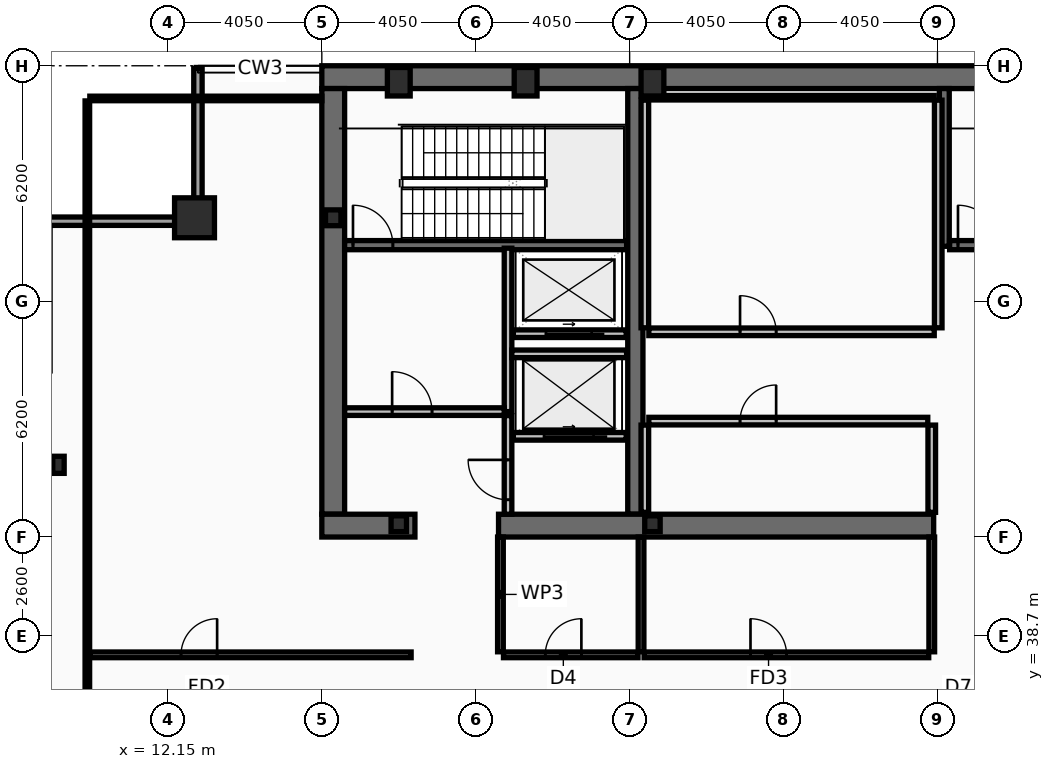
"""IFC4 building model, lengths in metres.
Left out: names, types, materials, properties, quantities, classifications, styles, units other than length and angle.
Written with IfcOpenShell. Run it as: python <this file> out.ifc"""

import sys

from ifc_helpers import new_model, si_unit, direction, frame, frame_2d, origin, origin_2d, place, context, subcontext, project, spatial, rectangle, hollow_rectangle, i_section, extrude, element, fill, save


model = new_model("IFC4")
c1 = context("Model", 3, precision=1e-05, world=origin(), true_north=direction((0.0, 1.0)))
c2 = subcontext(c1, "Body", "Model", "MODEL_VIEW")
j1 = project(units=[si_unit("LENGTHUNIT", "METRE"), si_unit("PLANEANGLEUNIT", "RADIAN")], contexts=[c1])
p1 = place(None, origin())
s1 = spatial("IfcSite", under=j1, at=p1, CompositionType="ELEMENT")
p2 = place(p1, origin())
s2 = spatial("IfcBuilding", under=s1, at=p2, CompositionType="ELEMENT")
p3 = place(p2, frame((0.0, 0.0, 257.0)))
s3 = spatial("IfcBuildingStorey", under=s2, at=p3, CompositionType="ELEMENT", Elevation=257.0)
p4 = place(p3, frame((16.2, 53.4, 0.0), z_axis=(0.0, 0.0, 1.0), x_axis=(1.0, 0.0, 0.0)))
e1 = element("IfcWall", 1, at=p4, inside=s3, PredefinedType="SHEAR", context=c2, shape_type="SweptSolid", body=[
    extrude(rectangle(XDim=40.5, YDim=0.6, at=frame_2d((20.25, 0.0))), origin(), (0.0, 0.0, 1.0), 4.64),
])
p5 = place(p3, frame((16.5, 41.9, 0.0), z_axis=(0.0, 0.0, 1.0), x_axis=(0.0, 1.0, 0.0)))
e2 = element("IfcWall", 2, at=p5, inside=s3, PredefinedType="SHEAR", context=c2, shape_type="SweptSolid", body=[
    extrude(rectangle(XDim=11.2, YDim=0.6, at=frame_2d((5.6, 0.0))), origin(), (0.0, 0.0, 1.0), 4.64),
])
p6 = place(p3, frame((24.45, 41.9, 0.0), z_axis=(0.0, 0.0, 1.0), x_axis=(0.0, 1.0, 0.0)))
e3 = element("IfcWall", 3, at=p6, inside=s3, PredefinedType="SHEAR", context=c2, shape_type="SweptSolid", body=[
    extrude(rectangle(XDim=11.2, YDim=0.4, at=frame_2d((5.6, 0.0))), origin(), (0.0, 0.0, 1.0), 4.64),
])
p7 = place(p3, frame((18.65, 41.6, 0.0), z_axis=(0.0, 0.0, 1.0), x_axis=(-1.0, 0.0, 0.0)))
e4 = element("IfcWall", 4, at=p7, inside=s3, PredefinedType="SHEAR", context=c2, shape_type="SweptSolid", body=[
    extrude(rectangle(XDim=2.45, YDim=0.6, at=frame_2d((1.225, 0.0))), origin(), (0.0, 0.0, 1.0), 4.64),
])
p8 = place(p3, frame((32.3, 41.6, 0.0), z_axis=(0.0, 0.0, 1.0), x_axis=(-1.0, 0.0, 0.0)))
e5 = element("IfcWall", 5, at=p8, inside=s3, PredefinedType="SHEAR", context=c2, shape_type="SweptSolid", body=[
    extrude(rectangle(XDim=11.45, YDim=0.6, at=frame_2d((5.725, 0.0))), origin(), (0.0, 0.0, 1.0), 4.64),
])
p9 = place(p3, frame((32.58, 48.95, 0.0), z_axis=(0.0, 0.0, 1.0), x_axis=(0.0, 1.0, 0.0)))
e6 = element("IfcWall", 6, at=p9, inside=s3, PredefinedType="SHEAR", context=c2, shape_type="SweptSolid", body=[
    extrude(rectangle(XDim=4.15, YDim=0.26, at=frame_2d((2.075, 0.0))), origin(), (0.0, 0.0, 1.0), 4.64),
])
p10 = place(p3, frame((16.8, 48.98, 0.0), z_axis=(0.0, 0.0, 1.0), x_axis=(1.0, 0.0, 0.0)))
e7 = element("IfcWall", 7, at=p10, inside=s3, PredefinedType="SHEAR", context=c2, shape_type="SweptSolid", body=[
    extrude(rectangle(XDim=7.42, YDim=0.24, at=frame_2d((3.71, 0.0))), origin(), (0.0, 0.0, 1.0), 4.64),
])
p11 = place(p10, frame((0.22, 0.0, 0.0)))
e8 = element("IfcOpeningElement", 8, at=p11, cuts=e7, PredefinedType="OPENING", context=c2, shape_type="SweptSolid", body=[
    extrude(rectangle(XDim=1.05, YDim=2.15, at=frame_2d((0.525, 1.075))), frame((0.0, 0.13, 0.0), z_axis=(0.0, -1.0, 0.0), x_axis=(1.0, 0.0, 0.0)), (0.0, 0.0, 1.0), 0.26),
])
p12 = place(p3, frame((32.72, 48.98, 0.0), z_axis=(0.0, 0.0, 1.0), x_axis=(1.0, 0.0, 0.0)))
e9 = element("IfcWall", 9, at=p12, inside=s3, PredefinedType="SHEAR", context=c2, shape_type="SweptSolid", body=[
    extrude(rectangle(XDim=7.56, YDim=0.24, at=frame_2d((3.78, 0.0))), origin(), (0.0, 0.0, 1.0), 4.64),
])
p13 = place(p12, frame((0.22, 0.0, 0.0)))
e10 = element("IfcOpeningElement", 10, at=p13, cuts=e9, PredefinedType="OPENING", context=c2, shape_type="SweptSolid", body=[
    extrude(rectangle(XDim=1.05, YDim=2.15, at=frame_2d((0.525, 1.075))), frame((0.0, 0.13, 0.0), z_axis=(0.0, -1.0, 0.0), x_axis=(1.0, 0.0, 0.0)), (0.0, 0.0, 1.0), 0.26),
])
p14 = place(p3, frame((12.85, 49.7, 0.0), z_axis=(0.0, 0.0, 1.0), x_axis=(1.0, 0.0, 0.0)))
e11 = element("IfcColumn", 11, at=p14, inside=s3, PredefinedType="COLUMN", context=c2, shape_type="SweptSolid", body=[
    extrude(hollow_rectangle(XDim=1.05, YDim=1.05, WallThickness=0.055, at=origin_2d()), origin(), (0.0, 0.0, 1.0), 4.8),
])
for number, where, z_axis, x_axis in (
    (12, (18.225, 53.28, 0.0), (0.0, 0.0, 1.0), (1.0, 0.0, 0.0)),
    (13, (21.562, 53.28, 0.0), (0.0, 0.0, 1.0), (1.0, 0.0, 0.0)),
    (14, (24.9, 53.28, 0.0), (0.0, 0.0, 1.0), (1.0, 0.0, 0.0)),
):
    element("IfcColumn", number, at=place(p3, frame(where, z_axis=z_axis, x_axis=x_axis)), inside=s3, PredefinedType="COLUMN", context=c2, shape_type="SweptSolid", body=[
        extrude(hollow_rectangle(XDim=0.6, YDim=0.75, WallThickness=0.045, at=origin_2d()), origin(), (0.0, 0.0, 1.0), 4.8),
    ])
p15 = place(p3, frame((9.27, 43.2, 0.0), z_axis=(0.0, 0.0, 1.0), x_axis=(1.0, 0.0, 0.0)))
e15 = element("IfcColumn", 15, at=p15, inside=s3, PredefinedType="COLUMN", context=c2, shape_type="SweptSolid", body=[
    extrude(i_section(OverallWidth=0.3, OverallDepth=0.45, WebThickness=0.014, FlangeThickness=0.026, at=origin_2d()), origin(), (0.0, 0.0, 1.0), 4.8),
])
for number, where, z_axis, x_axis in (
    (16, (16.5, 49.7, 0.0), (0.0, 0.0, 1.0), (1.0, 0.0, 0.0)),
    (17, (18.225, 41.65, 0.0), (0.0, 0.0, 1.0), (1.0, 0.0, 0.0)),
    (18, (24.9, 41.65, 0.0), (0.0, 0.0, 1.0), (1.0, 0.0, 0.0)),
):
    element("IfcColumn", number, at=place(p3, frame(where, z_axis=z_axis, x_axis=x_axis)), inside=s3, PredefinedType="COLUMN", context=c2, shape_type="SweptSolid", body=[
        extrude(i_section(OverallWidth=0.406, OverallDepth=0.416, WebThickness=0.03, FlangeThickness=0.048, at=origin_2d()), origin(), (0.0, 0.0, 1.0), 4.8),
    ])
p16 = place(p3, frame((8.83, 49.61, 0.0), z_axis=(0.0, 0.0, 1.0), x_axis=(1.0, 0.0, 0.0)))
e19 = element("IfcWall", 19, at=p16, inside=s3, PredefinedType="SOLIDWALL", context=c2, shape_type="SweptSolid", body=[
    extrude(rectangle(XDim=4.22, YDim=0.22, at=frame_2d((2.11, 0.0))), origin(), (0.0, 0.0, 1.0), 4.03),
])
p17 = place(p3, frame((12.94, 49.72, 0.0), z_axis=(0.0, 0.0, 1.0), x_axis=(0.0, 1.0, 0.0)))
e20 = element("IfcWall", 20, at=p17, inside=s3, PredefinedType="SOLIDWALL", context=c2, shape_type="SweptSolid", body=[
    extrude(rectangle(XDim=3.91, YDim=0.22, at=frame_2d((1.955, 0.0))), origin(), (0.0, 0.0, 1.0), 4.03),
])
p18 = place(p3, frame((24.21, 43.95, 0.0), z_axis=(0.0, 0.0, 1.0), x_axis=(-1.0, 0.0, 0.0)))
e21 = element("IfcWall", 21, at=p18, inside=s3, PredefinedType="PARTITIONING", context=c2, shape_type="SweptSolid", body=[
    extrude(rectangle(XDim=2.97, YDim=0.2, at=frame_2d((1.485, 0.0))), origin(), (0.0, 0.0, 1.0), 4.64),
])
p19 = place(p18, frame((0.86, 0.0, 0.0)))
e22 = element("IfcOpeningElement", 22, at=p19, cuts=e21, PredefinedType="OPENING", context=c2, shape_type="SweptSolid", body=[
    extrude(rectangle(XDim=1.3, YDim=2.18, at=frame_2d((0.65, 1.09))), frame((0.0, 0.11, 0.0), z_axis=(0.0, -1.0, 0.0), x_axis=(1.0, 0.0, 0.0)), (0.0, 0.0, 1.0), 0.22),
])
p20 = place(p3, frame((24.21, 46.65, 0.0), z_axis=(0.0, 0.0, 1.0), x_axis=(-1.0, 0.0, 0.0)))
e23 = element("IfcWall", 23, at=p20, inside=s3, PredefinedType="PARTITIONING", context=c2, shape_type="SweptSolid", body=[
    extrude(rectangle(XDim=2.97, YDim=0.2, at=frame_2d((1.485, 0.0))), origin(), (0.0, 0.0, 1.0), 4.64),
])
p21 = place(p20, frame((0.91, 0.0, 0.0)))
e24 = element("IfcOpeningElement", 24, at=p21, cuts=e23, PredefinedType="OPENING", context=c2, shape_type="SweptSolid", body=[
    extrude(rectangle(XDim=1.2, YDim=2.18, at=frame_2d((0.6, 1.09))), frame((0.0, 0.11, 0.0), z_axis=(0.0, -1.0, 0.0), x_axis=(1.0, 0.0, 0.0)), (0.0, 0.0, 1.0), 0.22),
])
p22 = place(p3, frame((21.1, 44.6, 0.0), z_axis=(0.0, 0.0, 1.0), x_axis=(0.0, 1.0, 0.0)))
e25 = element("IfcWall", 25, at=p22, inside=s3, PredefinedType="PARTITIONING", context=c2, shape_type="SweptSolid", body=[
    extrude(rectangle(XDim=4.3, YDim=0.2, at=frame_2d((2.15, 0.0))), origin(), (0.0, 0.0, 1.0), 4.64),
])
p23 = place(p3, frame((16.8, 44.6, 0.0), z_axis=(0.0, 0.0, 1.0), x_axis=(1.0, 0.0, 0.0)))
e26 = element("IfcWall", 26, at=p23, inside=s3, PredefinedType="PARTITIONING", context=c2, shape_type="SweptSolid", body=[
    extrude(rectangle(XDim=4.2, YDim=0.2, at=frame_2d((2.1, 0.0))), origin(), (0.0, 0.0, 1.0), 4.64),
])
p24 = place(p23, frame((1.25, 0.0, 0.0)))
e27 = element("IfcOpeningElement", 27, at=p24, cuts=e26, PredefinedType="OPENING", context=c2, shape_type="SweptSolid", body=[
    extrude(rectangle(XDim=1.05, YDim=2.15, at=frame_2d((0.525, 1.075))), frame((0.0, 0.11, 0.0), z_axis=(0.0, -1.0, 0.0), x_axis=(1.0, 0.0, 0.0)), (0.0, 0.0, 1.0), 0.22),
])
p25 = place(p3, frame((21.2, 46.12, 0.0), z_axis=(0.0, 0.0, 1.0), x_axis=(1.0, 0.0, 0.0)))
e28 = element("IfcWall", 28, at=p25, inside=s3, PredefinedType="PARTITIONING", context=c2, shape_type="SweptSolid", body=[
    extrude(rectangle(XDim=3.02, YDim=0.2, at=frame_2d((1.51, 0.0))), origin(), (0.0, 0.0, 1.0), 4.64),
])
p26 = place(p3, frame((21.1, 41.9, 0.0), z_axis=(0.0, 0.0, 1.0), x_axis=(0.0, 1.0, 0.0)))
e29 = element("IfcWall", 29, at=p26, inside=s3, PredefinedType="PARTITIONING", context=c2, shape_type="SweptSolid", body=[
    extrude(rectangle(XDim=2.595, YDim=0.2, at=frame_2d((1.298, 0.0))), origin(), (0.0, 0.0, 1.0), 4.64),
])
p27 = place(p26, frame((0.38, 0.0, 0.0)))
e30 = element("IfcOpeningElement", 30, at=p27, cuts=e29, PredefinedType="OPENING", context=c2, shape_type="SweptSolid", body=[
    extrude(rectangle(XDim=1.05, YDim=2.15, at=frame_2d((0.525, 1.075))), frame((0.0, 0.11, 0.0), z_axis=(0.0, -1.0, 0.0), x_axis=(1.0, 0.0, 0.0)), (0.0, 0.0, 1.0), 0.22),
])
for number, where, z_axis, x_axis in (
    (31, (24.7, 46.805, 0.0), (0.0, 0.0, 1.0), (0.0, 1.0, 0.0)),
    (32, (32.42, 46.805, 0.0), (0.0, 0.0, 1.0), (0.0, 1.0, 0.0)),
):
    element("IfcWall", number, at=place(p3, frame(where, z_axis=z_axis, x_axis=x_axis)), inside=s3, PredefinedType="PARTITIONING", context=c2, shape_type="SweptSolid", body=[
        extrude(rectangle(XDim=5.99, YDim=0.2, at=frame_2d((2.995, 0.0))), origin(), (0.0, 0.0, 1.0), 4.64),
    ])
p28 = place(p3, frame((24.805, 52.86, 0.0), z_axis=(0.0, 0.0, 1.0), x_axis=(1.0, 0.0, 0.0)))
e33 = element("IfcWall", 33, at=p28, inside=s3, PredefinedType="PARTITIONING", context=c2, shape_type="SweptSolid", body=[
    extrude(rectangle(XDim=7.51, YDim=0.12, at=frame_2d((3.755, 0.0))), origin(), (0.0, 0.0, 1.0), 4.64),
])
p29 = place(p3, frame((24.805, 46.7, 0.0), z_axis=(0.0, 0.0, 1.0), x_axis=(1.0, 0.0, 0.0)))
e34 = element("IfcWall", 34, at=p29, inside=s3, PredefinedType="PARTITIONING", context=c2, shape_type="SweptSolid", body=[
    extrude(rectangle(XDim=7.51, YDim=0.2, at=frame_2d((3.755, 0.0))), origin(), (0.0, 0.0, 1.0), 4.64),
])
p30 = place(p29, frame((2.4, 0.0, 0.0)))
e35 = element("IfcOpeningElement", 35, at=p30, cuts=e34, PredefinedType="OPENING", context=c2, shape_type="SweptSolid", body=[
    extrude(rectangle(XDim=0.95, YDim=2.1, at=frame_2d((0.475, 1.05))), frame((0.0, 0.11, 0.0), z_axis=(0.0, -1.0, 0.0), x_axis=(1.0, 0.0, 0.0)), (0.0, 0.0, 1.0), 0.22),
])
for number, where, z_axis, x_axis in (
    (36, (24.7, 41.95, 0.0), (0.0, 0.0, 1.0), (0.0, 1.0, 0.0)),
    (37, (32.25, 41.95, 0.0), (0.0, 0.0, 1.0), (0.0, 1.0, 0.0)),
):
    element("IfcWall", number, at=place(p3, frame(where, z_axis=z_axis, x_axis=x_axis)), inside=s3, PredefinedType="PARTITIONING", context=c2, shape_type="SweptSolid", body=[
        extrude(rectangle(XDim=2.295, YDim=0.2, at=frame_2d((1.147, 0.0))), origin(), (0.0, 0.0, 1.0), 4.64),
    ])
p31 = place(p3, frame((24.805, 44.35, 0.0), z_axis=(0.0, 0.0, 1.0), x_axis=(1.0, 0.0, 0.0)))
e38 = element("IfcWall", 38, at=p31, inside=s3, PredefinedType="PARTITIONING", context=c2, shape_type="SweptSolid", body=[
    extrude(rectangle(XDim=7.34, YDim=0.2, at=frame_2d((3.67, 0.0))), origin(), (0.0, 0.0, 1.0), 4.64),
])
p32 = place(p31, frame((2.4, 0.0, 0.0)))
e39 = element("IfcOpeningElement", 39, at=p32, cuts=e38, PredefinedType="OPENING", context=c2, shape_type="SweptSolid", body=[
    extrude(rectangle(XDim=0.95, YDim=2.1, at=frame_2d((0.475, 1.05))), frame((0.0, 0.11, 0.0), z_axis=(0.0, -1.0, 0.0), x_axis=(1.0, 0.0, 0.0)), (0.0, 0.0, 1.0), 0.22),
])
p33 = place(p3, frame((20.98, 38.2, 0.0), z_axis=(0.0, 0.0, 1.0), x_axis=(1.0, 0.0, 0.0)))
e40 = element("IfcWall", 40, at=p33, inside=s3, PredefinedType="PARTITIONING", context=c2, shape_type="SweptSolid", body=[
    extrude(rectangle(XDim=3.54, YDim=0.15, at=frame_2d((1.77, 0.0))), origin(), (0.0, 0.0, 1.0), 3.98),
])
p34 = place(p33, frame((1.1, 0.0, 0.0)))
e41 = element("IfcOpeningElement", 41, at=p34, cuts=e40, PredefinedType="OPENING", context=c2, shape_type="SweptSolid", body=[
    extrude(rectangle(XDim=0.95, YDim=2.05, at=frame_2d((0.475, 1.025))), frame((0.0, 0.085, 0.0), z_axis=(0.0, -1.0, 0.0), x_axis=(1.0, 0.0, 0.0)), (0.0, 0.0, 1.0), 0.17),
])
p35 = place(p3, frame((24.68, 38.2, 0.0), z_axis=(0.0, 0.0, 1.0), x_axis=(1.0, 0.0, 0.0)))
e42 = element("IfcWall", 42, at=p35, inside=s3, PredefinedType="PARTITIONING", context=c2, shape_type="SweptSolid", body=[
    extrude(rectangle(XDim=7.49, YDim=0.15, at=frame_2d((3.745, 0.0))), origin(), (0.0, 0.0, 1.0), 3.98),
])
p36 = place(p35, frame((2.8, 0.0, 0.0)))
e43 = element("IfcOpeningElement", 43, at=p36, cuts=e42, PredefinedType="OPENING", context=c2, shape_type="SweptSolid", body=[
    extrude(rectangle(XDim=0.95, YDim=2.1, at=frame_2d((0.475, 1.05))), frame((0.0, 0.085, 0.0), z_axis=(0.0, -1.0, 0.0), x_axis=(1.0, 0.0, 0.0)), (0.0, 0.0, 1.0), 0.17),
])
p37 = place(p3, frame((20.9, 38.28, 0.0), z_axis=(0.0, 0.0, 1.0), x_axis=(0.0, 1.0, 0.0)))
e44 = element("IfcWall", 44, at=p37, inside=s3, PredefinedType="PARTITIONING", context=c2, shape_type="SweptSolid", body=[
    extrude(rectangle(XDim=3.02, YDim=0.15, at=frame_2d((1.51, 0.0))), origin(), (0.0, 0.0, 1.0), 4.64),
])
p38 = place(p3, frame((24.6, 38.28, 0.0), z_axis=(0.0, 0.0, 1.0), x_axis=(0.0, 1.0, 0.0)))
e45 = element("IfcWall", 45, at=p38, inside=s3, PredefinedType="PARTITIONING", context=c2, shape_type="SweptSolid", body=[
    extrude(rectangle(XDim=3.02, YDim=0.15, at=frame_2d((1.51, 0.0))), origin(), (0.0, 0.0, 1.0), 3.98),
])
p39 = place(p3, frame((32.25, 38.28, 0.0), z_axis=(0.0, 0.0, 1.0), x_axis=(0.0, 1.0, 0.0)))
e46 = element("IfcWall", 46, at=p39, inside=s3, PredefinedType="PARTITIONING", context=c2, shape_type="SweptSolid", body=[
    extrude(rectangle(XDim=3.02, YDim=0.15, at=frame_2d((1.51, 0.0))), origin(), (0.0, 0.0, 1.0), 4.64),
])
p40 = place(p3, frame((10.095, 38.2, 0.0), z_axis=(0.0, 0.0, 1.0), x_axis=(1.0, 0.0, 0.0)))
e47 = element("IfcWall", 47, at=p40, inside=s3, PredefinedType="PARTITIONING", context=c2, shape_type="SweptSolid", body=[
    extrude(rectangle(XDim=8.455, YDim=0.15, at=frame_2d((4.228, 0.0))), origin(), (0.0, 0.0, 1.0), 3.98),
])
p41 = place(p40, frame((2.4, 0.0, 0.0)))
e48 = element("IfcOpeningElement", 48, at=p41, cuts=e47, PredefinedType="OPENING", context=c2, shape_type="SweptSolid", body=[
    extrude(rectangle(XDim=0.95, YDim=2.1, at=frame_2d((0.475, 1.05))), frame((0.0, 0.085, 0.0), z_axis=(0.0, -1.0, 0.0), x_axis=(1.0, 0.0, 0.0)), (0.0, 0.0, 1.0), 0.17),
])
p42 = place(p3, frame((10.03, 10.665, 0.0), z_axis=(0.0, 0.0, 1.0), x_axis=(0.0, 1.0, 0.0)))
e49 = element("IfcWall", 49, at=p42, inside=s3, PredefinedType="PARTITIONING", context=c2, shape_type="SweptSolid", body=[
    extrude(rectangle(XDim=42.11, YDim=0.12, at=frame_2d((21.055, 0.0))), origin(), (0.0, 0.0, 1.0), 3.98),
])
p43 = place(p3, frame((10.095, 52.84, 0.0), z_axis=(0.0, 0.0, 1.0), x_axis=(1.0, 0.0, 0.0)))
e50 = element("IfcWall", 50, at=p43, inside=s3, PredefinedType="PARTITIONING", context=c2, shape_type="SweptSolid", body=[
    extrude(rectangle(XDim=6.105, YDim=0.12, at=frame_2d((3.052, 0.0))), origin(), (0.0, 0.0, 1.0), 4.64),
])
p44 = place(p11, origin())
e51 = element("IfcDoor", 51, at=p44, inside=s3, OperationType="SINGLE_SWING_LEFT", PredefinedType="DOOR", context=c2, shape_type="SweptSolid", body=[
    extrude(rectangle(XDim=1.05, YDim=2.15, at=frame_2d((0.525, 1.075))), frame((0.0, 0.025, 0.0), z_axis=(0.0, -1.0, 0.0), x_axis=(1.0, 0.0, 0.0)), (0.0, 0.0, 1.0), 0.05),
])
fill(e8, e51)
p45 = place(p13, origin())
e52 = element("IfcDoor", 52, at=p45, inside=s3, OperationType="SINGLE_SWING_LEFT", PredefinedType="DOOR", context=c2, shape_type="SweptSolid", body=[
    extrude(rectangle(XDim=1.05, YDim=2.15, at=frame_2d((0.525, 1.075))), frame((0.0, 0.025, 0.0), z_axis=(0.0, -1.0, 0.0), x_axis=(1.0, 0.0, 0.0)), (0.0, 0.0, 1.0), 0.05),
])
fill(e10, e52)
p46 = place(p19, origin())
e53 = element("IfcDoor", 53, at=p46, inside=s3, OperationType="SLIDING_TO_LEFT", PredefinedType="DOOR", context=c2, shape_type="SweptSolid", body=[
    extrude(rectangle(XDim=1.3, YDim=2.18, at=frame_2d((0.65, 1.09))), frame((0.0, 0.025, 0.0), z_axis=(0.0, -1.0, 0.0), x_axis=(1.0, 0.0, 0.0)), (0.0, 0.0, 1.0), 0.05),
])
fill(e22, e53)
p47 = place(p21, origin())
e54 = element("IfcDoor", 54, at=p47, inside=s3, OperationType="SLIDING_TO_LEFT", PredefinedType="DOOR", context=c2, shape_type="SweptSolid", body=[
    extrude(rectangle(XDim=1.2, YDim=2.18, at=frame_2d((0.6, 1.09))), frame((0.0, 0.025, 0.0), z_axis=(0.0, -1.0, 0.0), x_axis=(1.0, 0.0, 0.0)), (0.0, 0.0, 1.0), 0.05),
])
fill(e24, e54)
p48 = place(p24, origin())
e55 = element("IfcDoor", 55, at=p48, inside=s3, OperationType="SINGLE_SWING_LEFT", PredefinedType="DOOR", context=c2, shape_type="SweptSolid", body=[
    extrude(rectangle(XDim=1.05, YDim=2.15, at=frame_2d((0.525, 1.075))), frame((0.0, 0.025, 0.0), z_axis=(0.0, -1.0, 0.0), x_axis=(1.0, 0.0, 0.0)), (0.0, 0.0, 1.0), 0.05),
])
fill(e27, e55)
p49 = place(p27, origin())
e56 = element("IfcDoor", 56, at=p49, inside=s3, OperationType="SINGLE_SWING_RIGHT", PredefinedType="DOOR", context=c2, shape_type="SweptSolid", body=[
    extrude(rectangle(XDim=1.05, YDim=2.15, at=frame_2d((0.525, 1.075))), frame((0.0, 0.025, 0.0), z_axis=(0.0, -1.0, 0.0), x_axis=(1.0, 0.0, 0.0)), (0.0, 0.0, 1.0), 0.05),
])
fill(e30, e56)
p50 = place(p30, origin())
e57 = element("IfcDoor", 57, at=p50, inside=s3, OperationType="SINGLE_SWING_LEFT", PredefinedType="DOOR", context=c2, shape_type="SweptSolid", body=[
    extrude(rectangle(XDim=0.95, YDim=2.1, at=frame_2d((0.475, 1.05))), frame((0.0, 0.025, 0.0), z_axis=(0.0, -1.0, 0.0), x_axis=(1.0, 0.0, 0.0)), (0.0, 0.0, 1.0), 0.05),
])
fill(e35, e57)
p51 = place(p32, origin())
e58 = element("IfcDoor", 58, at=p51, inside=s3, OperationType="SINGLE_SWING_RIGHT", PredefinedType="DOOR", context=c2, shape_type="SweptSolid", body=[
    extrude(rectangle(XDim=0.95, YDim=2.1, at=frame_2d((0.475, 1.05))), frame((0.0, 0.025, 0.0), z_axis=(0.0, -1.0, 0.0), x_axis=(1.0, 0.0, 0.0)), (0.0, 0.0, 1.0), 0.05),
])
fill(e39, e58)
p52 = place(p34, origin())
e59 = element("IfcDoor", 59, at=p52, inside=s3, OperationType="SINGLE_SWING_RIGHT", PredefinedType="DOOR", context=c2, shape_type="SweptSolid", body=[
    extrude(rectangle(XDim=0.95, YDim=2.05, at=frame_2d((0.475, 1.025))), frame((0.0, 0.025, 0.0), z_axis=(0.0, -1.0, 0.0), x_axis=(1.0, 0.0, 0.0)), (0.0, 0.0, 1.0), 0.05),
])
fill(e41, e59)
p53 = place(p36, origin())
e60 = element("IfcDoor", 60, at=p53, inside=s3, OperationType="SINGLE_SWING_LEFT", PredefinedType="DOOR", context=c2, shape_type="SweptSolid", body=[
    extrude(rectangle(XDim=0.95, YDim=2.1, at=frame_2d((0.475, 1.05))), frame((0.0, 0.025, 0.0), z_axis=(0.0, -1.0, 0.0), x_axis=(1.0, 0.0, 0.0)), (0.0, 0.0, 1.0), 0.05),
])
fill(e43, e60)
p54 = place(p41, origin())
e61 = element("IfcDoor", 61, at=p54, inside=s3, OperationType="SINGLE_SWING_RIGHT", PredefinedType="DOOR", context=c2, shape_type="SweptSolid", body=[
    extrude(rectangle(XDim=0.95, YDim=2.1, at=frame_2d((0.475, 1.05))), frame((0.0, 0.025, 0.0), z_axis=(0.0, -1.0, 0.0), x_axis=(1.0, 0.0, 0.0)), (0.0, 0.0, 1.0), 0.05),
])
fill(e48, e61)
save(model, sys.argv[1])
